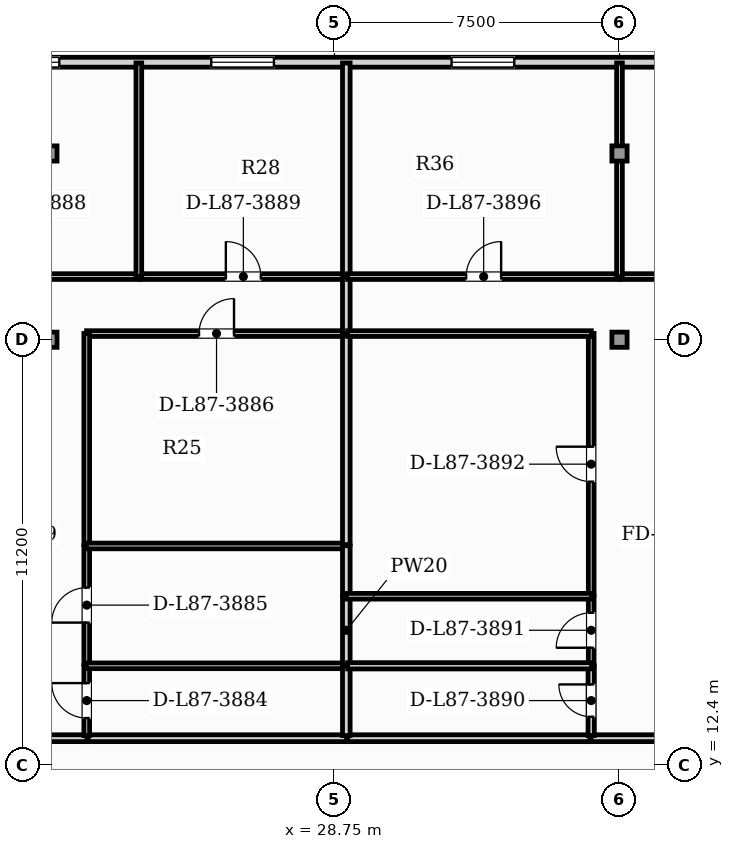
"""IFC4 building model, lengths in metres.
Left out: names, types, materials, properties, quantities, classifications, styles, units other than length and angle.
Written with IfcOpenShell. Run it as: python <this file> out.ifc"""

import sys

from ifc_helpers import new_model, si_unit, direction, frame, frame_2d, origin, origin_2d, place, context, subcontext, project, spatial, rectangle, hollow_rectangle, extrude, element, fill, save


model = new_model("IFC4")
c1 = context("Model", 3, precision=1e-05, world=origin(), true_north=direction((0.0, 1.0)))
c2 = subcontext(c1, "Body", "Model", "MODEL_VIEW")
j1 = project(units=[si_unit("LENGTHUNIT", "METRE"), si_unit("PLANEANGLEUNIT", "RADIAN")], contexts=[c1])
p1 = place(None, origin())
s1 = spatial("IfcSite", under=j1, at=p1, CompositionType="ELEMENT")
p2 = place(p1, origin())
s2 = spatial("IfcBuilding", under=s1, at=p2, CompositionType="ELEMENT")
p3 = place(p2, frame((0.0, 0.0, 353.45)))
s3 = spatial("IfcBuildingStorey", under=s2, at=p3, CompositionType="ELEMENT", Elevation=353.45)
for number, where, z_axis, x_axis in (
    (1, (21.25, 23.6, 0.0), (0.0, 0.0, 1.0), (1.0, 0.0, 0.0)),
    (2, (36.25, 23.6, 0.0), (0.0, 0.0, 1.0), (1.0, 0.0, 0.0)),
    (3, (21.25, 28.5, 0.0), (0.0, 0.0, 1.0), (1.0, 0.0, 0.0)),
    (4, (36.25, 28.5, 0.0), (0.0, 0.0, 1.0), (1.0, 0.0, 0.0)),
):
    element("IfcColumn", number, at=place(p3, frame(where, z_axis=z_axis, x_axis=x_axis)), inside=s3, PredefinedType="COLUMN", context=c2, shape_type="SweptSolid", body=[
        extrude(hollow_rectangle(XDim=0.4, YDim=0.4, WallThickness=0.02, at=origin_2d()), origin(), (0.0, 0.0, 1.0), 4.4),
    ])
p4 = place(p3, frame((44.627, 30.901, 0.0), z_axis=(0.0, 0.0, 1.0), x_axis=(-1.0, 0.0, 0.0)))
e5 = element("IfcWall", 5, at=p4, inside=s3, PredefinedType="SOLIDWALL", context=c2, shape_type="SweptSolid", body=[
    extrude(rectangle(XDim=31.754, YDim=0.26, at=frame_2d((15.877, 0.0))), origin(), (0.0, 0.0, 1.0), 4.14),
])
p5 = place(p4, frame((29.334, 0.0, 0.88)))
e6 = element("IfcOpeningElement", 6, at=p5, cuts=e5, PredefinedType="OPENING", context=c2, shape_type="SweptSolid", body=[
    extrude(rectangle(XDim=1.65, YDim=2.0, at=frame_2d((0.825, 1.0))), frame((0.0, 0.14, 0.0), z_axis=(0.0, -1.0, 0.0), x_axis=(1.0, 0.0, 0.0)), (0.0, 0.0, 1.0), 0.28),
])
p6 = place(p4, frame((23.117, 0.0, 0.88)))
e7 = element("IfcOpeningElement", 7, at=p6, cuts=e5, PredefinedType="OPENING", context=c2, shape_type="SweptSolid", body=[
    extrude(rectangle(XDim=1.65, YDim=2.0, at=frame_2d((0.825, 1.0))), frame((0.0, 0.14, 0.0), z_axis=(0.0, -1.0, 0.0), x_axis=(1.0, 0.0, 0.0)), (0.0, 0.0, 1.0), 0.28),
])
p7 = place(p4, frame((17.469, 0.0, 0.88)))
e8 = element("IfcOpeningElement", 8, at=p7, cuts=e5, PredefinedType="OPENING", context=c2, shape_type="SweptSolid", body=[
    extrude(rectangle(XDim=1.65, YDim=2.0, at=frame_2d((0.825, 1.0))), frame((0.0, 0.14, 0.0), z_axis=(0.0, -1.0, 0.0), x_axis=(1.0, 0.0, 0.0)), (0.0, 0.0, 1.0), 0.28),
])
p8 = place(p4, frame((11.146, 0.0, 0.88)))
e9 = element("IfcOpeningElement", 9, at=p8, cuts=e5, PredefinedType="OPENING", context=c2, shape_type="SweptSolid", body=[
    extrude(rectangle(XDim=1.65, YDim=2.0, at=frame_2d((0.825, 1.0))), frame((0.0, 0.14, 0.0), z_axis=(0.0, -1.0, 0.0), x_axis=(1.0, 0.0, 0.0)), (0.0, 0.0, 1.0), 0.28),
])
p9 = place(p4, frame((4.732, 0.0, 0.88)))
e10 = element("IfcOpeningElement", 10, at=p9, cuts=e5, PredefinedType="OPENING", context=c2, shape_type="SweptSolid", body=[
    extrude(rectangle(XDim=1.65, YDim=2.0, at=frame_2d((0.825, 1.0))), frame((0.0, 0.14, 0.0), z_axis=(0.0, -1.0, 0.0), x_axis=(1.0, 0.0, 0.0)), (0.0, 0.0, 1.0), 0.28),
])
p10 = place(p3, frame((17.248, 13.115, 0.0), z_axis=(0.0, 0.0, 1.0), x_axis=(1.0, 0.0, 0.0)))
e11 = element("IfcWall", 11, at=p10, inside=s3, PredefinedType="PARTITIONING", context=c2, shape_type="SweptSolid", body=[
    extrude(rectangle(XDim=4.99, YDim=0.18, at=frame_2d((2.495, 0.0))), origin(), (0.0, 0.0, 1.0), 4.14),
])
p11 = place(p10, frame((1.995, 0.0, 0.0)))
e12 = element("IfcOpeningElement", 12, at=p11, cuts=e11, PredefinedType="OPENING", context=c2, shape_type="SweptSolid", body=[
    extrude(rectangle(XDim=1.0, YDim=2.15, at=frame_2d((0.5, 1.075))), frame((0.0, 0.1, 0.0), z_axis=(0.0, -1.0, 0.0), x_axis=(1.0, 0.0, 0.0)), (0.0, 0.0, 1.0), 0.2),
])
p12 = place(p3, frame((22.268, 13.115, 0.0), z_axis=(0.0, 0.0, 1.0), x_axis=(1.0, 0.0, 0.0)))
e13 = element("IfcWall", 13, at=p12, inside=s3, PredefinedType="PARTITIONING", context=c2, shape_type="SweptSolid", body=[
    extrude(rectangle(XDim=6.8, YDim=0.18, at=frame_2d((3.4, 0.0))), origin(), (0.0, 0.0, 1.0), 4.14),
])
p13 = place(p3, frame((35.5, 13.115, 0.0), z_axis=(0.0, 0.0, 1.0), x_axis=(1.0, 0.0, 0.0)))
e14 = element("IfcWall", 14, at=p13, inside=s3, PredefinedType="PARTITIONING", context=c2, shape_type="SweptSolid", body=[
    extrude(rectangle(XDim=4.99, YDim=0.18, at=frame_2d((2.495, 0.0))), origin(), (0.0, 0.0, 1.0), 4.14),
])
p14 = place(p13, frame((1.995, 0.0, 0.0)))
e15 = element("IfcOpeningElement", 15, at=p14, cuts=e14, PredefinedType="OPENING", context=c2, shape_type="SweptSolid", body=[
    extrude(rectangle(XDim=1.0, YDim=2.15, at=frame_2d((0.5, 1.075))), frame((0.0, 0.1, 0.0), z_axis=(0.0, -1.0, 0.0), x_axis=(1.0, 0.0, 0.0)), (0.0, 0.0, 1.0), 0.2),
])
p15 = place(p3, frame((29.097, 13.115, 0.0), z_axis=(0.0, 0.0, 1.0), x_axis=(1.0, 0.0, 0.0)))
e16 = element("IfcWall", 16, at=p15, inside=s3, PredefinedType="PARTITIONING", context=c2, shape_type="SweptSolid", body=[
    extrude(rectangle(XDim=6.373, YDim=0.18, at=frame_2d((3.187, 0.0))), origin(), (0.0, 0.0, 1.0), 4.14),
])
p16 = place(p3, frame((22.232, 13.185, 0.0), z_axis=(0.0, 0.0, 1.0), x_axis=(0.0, 1.0, 0.0)))
e17 = element("IfcWall", 17, at=p16, inside=s3, PredefinedType="PARTITIONING", context=c2, shape_type="SweptSolid", body=[
    extrude(rectangle(XDim=1.84, YDim=0.15, at=frame_2d((0.92, 0.0))), origin(), (0.0, 0.0, 1.0), 4.14),
])
p17 = place(p16, frame((0.46, 0.0, 0.0)))
e18 = element("IfcOpeningElement", 18, at=p17, cuts=e17, PredefinedType="OPENING", context=c2, shape_type="SweptSolid", body=[
    extrude(rectangle(XDim=0.92, YDim=2.1, at=frame_2d((0.46, 1.05))), frame((0.0, 0.085, 0.0), z_axis=(0.0, -1.0, 0.0), x_axis=(1.0, 0.0, 0.0)), (0.0, 0.0, 1.0), 0.17),
])
p18 = place(p3, frame((22.232, 15.055, 0.0), z_axis=(0.0, 0.0, 1.0), x_axis=(0.0, 1.0, 0.0)))
e19 = element("IfcWall", 19, at=p18, inside=s3, PredefinedType="PARTITIONING", context=c2, shape_type="SweptSolid", body=[
    extrude(rectangle(XDim=3.124, YDim=0.15, at=frame_2d((1.562, 0.0))), origin(), (0.0, 0.0, 1.0), 4.14),
])
p19 = place(p18, frame((1.102, 0.0, 0.0)))
e20 = element("IfcOpeningElement", 20, at=p19, cuts=e19, PredefinedType="OPENING", context=c2, shape_type="SweptSolid", body=[
    extrude(rectangle(XDim=0.92, YDim=2.1, at=frame_2d((0.46, 1.05))), frame((0.0, 0.085, 0.0), z_axis=(0.0, -1.0, 0.0), x_axis=(1.0, 0.0, 0.0)), (0.0, 0.0, 1.0), 0.17),
])
p20 = place(p3, frame((22.228, 23.761, 0.0), z_axis=(0.0, 0.0, 1.0), x_axis=(1.0, 0.0, 0.0)))
e21 = element("IfcWall", 21, at=p20, inside=s3, PredefinedType="PARTITIONING", context=c2, shape_type="SweptSolid", body=[
    extrude(rectangle(XDim=6.84, YDim=0.15, at=frame_2d((3.42, 0.0))), origin(), (0.0, 0.0, 1.0), 3.24),
])
p21 = place(p20, frame((2.96, 0.0, 0.0)))
e22 = element("IfcOpeningElement", 22, at=p21, cuts=e21, PredefinedType="OPENING", context=c2, shape_type="SweptSolid", body=[
    extrude(rectangle(XDim=0.92, YDim=2.1, at=frame_2d((0.46, 1.05))), frame((0.0, 0.085, 0.0), z_axis=(0.0, -1.0, 0.0), x_axis=(1.0, 0.0, 0.0)), (0.0, 0.0, 1.0), 0.17),
])
p22 = place(p3, frame((22.232, 18.208, 0.0), z_axis=(0.0, 0.0, 1.0), x_axis=(0.0, 1.0, 0.0)))
e23 = element("IfcWall", 23, at=p22, inside=s3, PredefinedType="PARTITIONING", context=c2, shape_type="SweptSolid", body=[
    extrude(rectangle(XDim=5.558, YDim=0.15, at=frame_2d((2.779, 0.0))), origin(), (0.0, 0.0, 1.0), 4.14),
])
p23 = place(p3, frame((17.802, 25.261, 0.0), z_axis=(0.0, 0.0, 1.0), x_axis=(1.0, 0.0, 0.0)))
e24 = element("IfcWall", 24, at=p23, inside=s3, PredefinedType="PARTITIONING", context=c2, shape_type="SweptSolid", body=[
    extrude(rectangle(XDim=5.806, YDim=0.15, at=frame_2d((2.903, 0.0))), origin(), (0.0, 0.0, 1.0), 4.14),
])
p24 = place(p23, frame((2.443, 0.0, 0.0)))
e25 = element("IfcOpeningElement", 25, at=p24, cuts=e24, PredefinedType="OPENING", context=c2, shape_type="SweptSolid", body=[
    extrude(rectangle(XDim=0.92, YDim=2.1, at=frame_2d((0.46, 1.05))), frame((0.0, 0.085, 0.0), z_axis=(0.0, -1.0, 0.0), x_axis=(1.0, 0.0, 0.0)), (0.0, 0.0, 1.0), 0.17),
])
p25 = place(p3, frame((23.638, 25.261, 0.0), z_axis=(0.0, 0.0, 1.0), x_axis=(1.0, 0.0, 0.0)))
e26 = element("IfcWall", 26, at=p25, inside=s3, PredefinedType="PARTITIONING", context=c2, shape_type="SweptSolid", body=[
    extrude(rectangle(XDim=5.429, YDim=0.15, at=frame_2d((2.714, 0.0))), origin(), (0.0, 0.0, 1.0), 4.14),
])
p26 = place(p25, frame((2.254, 0.0, 0.0)))
e27 = element("IfcOpeningElement", 27, at=p26, cuts=e26, PredefinedType="OPENING", context=c2, shape_type="SweptSolid", body=[
    extrude(rectangle(XDim=0.92, YDim=2.1, at=frame_2d((0.46, 1.05))), frame((0.0, 0.085, 0.0), z_axis=(0.0, -1.0, 0.0), x_axis=(1.0, 0.0, 0.0)), (0.0, 0.0, 1.0), 0.17),
])
p27 = place(p3, frame((29.062, 23.756, 0.0), z_axis=(0.0, 0.0, 1.0), x_axis=(0.0, 1.0, 0.0)))
e28 = element("IfcWall", 28, at=p27, inside=s3, PredefinedType="PARTITIONING", context=c2, shape_type="SweptSolid", body=[
    extrude(rectangle(XDim=1.51, YDim=0.2, at=frame_2d((0.755, 0.0))), origin(), (0.0, 0.0, 1.0), 4.14),
])
p28 = place(p3, frame((22.228, 15.02, 0.0), z_axis=(0.0, 0.0, 1.0), x_axis=(1.0, 0.0, 0.0)))
e29 = element("IfcWall", 29, at=p28, inside=s3, PredefinedType="PARTITIONING", context=c2, shape_type="SweptSolid", body=[
    extrude(rectangle(XDim=6.84, YDim=0.15, at=frame_2d((3.42, 0.0))), origin(), (0.0, 0.0, 1.0), 4.14),
])
p29 = place(p3, frame((29.062, 13.185, 0.0), z_axis=(0.0, 0.0, 1.0), x_axis=(0.0, 1.0, 0.0)))
e30 = element("IfcWall", 30, at=p29, inside=s3, PredefinedType="PARTITIONING", context=c2, shape_type="SweptSolid", body=[
    extrude(rectangle(XDim=1.84, YDim=0.2, at=frame_2d((0.92, 0.0))), origin(), (0.0, 0.0, 1.0), 4.14),
])
p30 = place(p3, frame((22.228, 18.173, 0.0), z_axis=(0.0, 0.0, 1.0), x_axis=(1.0, 0.0, 0.0)))
e31 = element("IfcWall", 31, at=p30, inside=s3, PredefinedType="PARTITIONING", context=c2, shape_type="SweptSolid", body=[
    extrude(rectangle(XDim=6.84, YDim=0.15, at=frame_2d((3.42, 0.0))), origin(), (0.0, 0.0, 1.0), 4.14),
])
p31 = place(p3, frame((29.062, 15.055, 0.0), z_axis=(0.0, 0.0, 1.0), x_axis=(0.0, 1.0, 0.0)))
e32 = element("IfcWall", 32, at=p31, inside=s3, PredefinedType="PARTITIONING", context=c2, shape_type="SweptSolid", body=[
    extrude(rectangle(XDim=1.8, YDim=0.2, at=frame_2d((0.9, 0.0))), origin(), (0.0, 0.0, 1.0), 4.14),
])
p32 = place(p3, frame((29.062, 16.885, 0.0), z_axis=(0.0, 0.0, 1.0), x_axis=(0.0, 1.0, 0.0)))
e33 = element("IfcWall", 33, at=p32, inside=s3, PredefinedType="PARTITIONING", context=c2, shape_type="SweptSolid", body=[
    extrude(rectangle(XDim=1.293, YDim=0.2, at=frame_2d((0.647, 0.0))), origin(), (0.0, 0.0, 1.0), 4.14),
])
p33 = place(p3, frame((29.062, 18.208, 0.0), z_axis=(0.0, 0.0, 1.0), x_axis=(0.0, 1.0, 0.0)))
e34 = element("IfcWall", 34, at=p33, inside=s3, PredefinedType="PARTITIONING", context=c2, shape_type="SweptSolid", body=[
    extrude(rectangle(XDim=5.518, YDim=0.2, at=frame_2d((2.759, 0.0))), origin(), (0.0, 0.0, 1.0), 4.14),
])
p34 = place(p3, frame((23.603, 25.256, 0.0), z_axis=(0.0, 0.0, 1.0), x_axis=(0.0, 1.0, 0.0)))
e35 = element("IfcWall", 35, at=p34, inside=s3, PredefinedType="PARTITIONING", context=c2, shape_type="SweptSolid", body=[
    extrude(rectangle(XDim=5.625, YDim=0.15, at=frame_2d((2.813, 0.0))), origin(), (0.0, 0.0, 1.0), 4.14),
])
p35 = place(p3, frame((29.062, 25.296, 0.0), z_axis=(0.0, 0.0, 1.0), x_axis=(0.0, 1.0, 0.0)))
e36 = element("IfcWall", 36, at=p35, inside=s3, PredefinedType="PARTITIONING", context=c2, shape_type="SweptSolid", body=[
    extrude(rectangle(XDim=5.585, YDim=0.2, at=frame_2d((2.793, 0.0))), origin(), (0.0, 0.0, 1.0), 4.14),
])
p36 = place(p3, frame((35.506, 13.185, 0.0), z_axis=(0.0, 0.0, 1.0), x_axis=(0.0, 1.0, 0.0)))
e37 = element("IfcWall", 37, at=p36, inside=s3, PredefinedType="PLUMBINGWALL", context=c2, shape_type="SweptSolid", body=[
    extrude(rectangle(XDim=1.84, YDim=0.165, at=frame_2d((0.92, 0.0))), origin(), (0.0, 0.0, 1.0), 4.14),
])
p37 = place(p36, frame((0.495, 0.0, 0.0)))
e38 = element("IfcOpeningElement", 38, at=p37, cuts=e37, PredefinedType="OPENING", context=c2, shape_type="SweptSolid", body=[
    extrude(rectangle(XDim=0.85, YDim=2.1, at=frame_2d((0.425, 1.05))), frame((0.0, 0.093, 0.0), z_axis=(0.0, -1.0, 0.0), x_axis=(1.0, 0.0, 0.0)), (0.0, 0.0, 1.0), 0.185),
])
p38 = place(p3, frame((35.506, 15.055, 0.0), z_axis=(0.0, 0.0, 1.0), x_axis=(0.0, 1.0, 0.0)))
e39 = element("IfcWall", 39, at=p38, inside=s3, PredefinedType="PARTITIONING", context=c2, shape_type="SweptSolid", body=[
    extrude(rectangle(XDim=1.8, YDim=0.15, at=frame_2d((0.9, 0.0))), origin(), (0.0, 0.0, 1.0), 4.14),
])
p39 = place(p38, frame((0.44, 0.0, 0.0)))
e40 = element("IfcOpeningElement", 40, at=p39, cuts=e39, PredefinedType="OPENING", context=c2, shape_type="SweptSolid", body=[
    extrude(rectangle(XDim=0.92, YDim=2.1, at=frame_2d((0.46, 1.05))), frame((0.0, 0.085, 0.0), z_axis=(0.0, -1.0, 0.0), x_axis=(1.0, 0.0, 0.0)), (0.0, 0.0, 1.0), 0.17),
])
p40 = place(p3, frame((35.506, 16.885, 0.0), z_axis=(0.0, 0.0, 1.0), x_axis=(0.0, 1.0, 0.0)))
e41 = element("IfcWall", 41, at=p40, inside=s3, PredefinedType="PARTITIONING", context=c2, shape_type="SweptSolid", body=[
    extrude(rectangle(XDim=6.881, YDim=0.15, at=frame_2d((3.44, 0.0))), origin(), (0.0, 0.0, 1.0), 4.14),
])
p41 = place(p40, frame((2.981, 0.0, 0.0)))
e42 = element("IfcOpeningElement", 42, at=p41, cuts=e41, PredefinedType="OPENING", context=c2, shape_type="SweptSolid", body=[
    extrude(rectangle(XDim=0.92, YDim=2.1, at=frame_2d((0.46, 1.05))), frame((0.0, 0.085, 0.0), z_axis=(0.0, -1.0, 0.0), x_axis=(1.0, 0.0, 0.0)), (0.0, 0.0, 1.0), 0.17),
])
p42 = place(p3, frame((29.097, 23.761, 0.0), z_axis=(0.0, 0.0, 1.0), x_axis=(1.0, 0.0, 0.0)))
e43 = element("IfcWall", 43, at=p42, inside=s3, PredefinedType="PARTITIONING", context=c2, shape_type="SweptSolid", body=[
    extrude(rectangle(XDim=6.413, YDim=0.15, at=frame_2d((3.207, 0.0))), origin(), (0.0, 0.0, 1.0), 3.24),
])
p43 = place(p3, frame((29.097, 25.261, 0.0), z_axis=(0.0, 0.0, 1.0), x_axis=(1.0, 0.0, 0.0)))
e44 = element("IfcWall", 44, at=p43, inside=s3, PredefinedType="PARTITIONING", context=c2, shape_type="SweptSolid", body=[
    extrude(rectangle(XDim=7.158, YDim=0.15, at=frame_2d((3.579, 0.0))), origin(), (0.0, 0.0, 1.0), 4.14),
])
p44 = place(p43, frame((3.119, 0.0, 0.0)))
e45 = element("IfcOpeningElement", 45, at=p44, cuts=e44, PredefinedType="OPENING", context=c2, shape_type="SweptSolid", body=[
    extrude(rectangle(XDim=0.92, YDim=2.1, at=frame_2d((0.46, 1.05))), frame((0.0, 0.085, 0.0), z_axis=(0.0, -1.0, 0.0), x_axis=(1.0, 0.0, 0.0)), (0.0, 0.0, 1.0), 0.17),
])
p45 = place(p3, frame((36.285, 25.261, 0.0), z_axis=(0.0, 0.0, 1.0), x_axis=(1.0, 0.0, 0.0)))
e46 = element("IfcWall", 46, at=p45, inside=s3, PredefinedType="PARTITIONING", context=c2, shape_type="SweptSolid", body=[
    extrude(rectangle(XDim=5.611, YDim=0.15, at=frame_2d((2.806, 0.0))), origin(), (0.0, 0.0, 1.0), 4.14),
])
p46 = place(p45, frame((2.345, 0.0, 0.0)))
e47 = element("IfcOpeningElement", 47, at=p46, cuts=e46, PredefinedType="OPENING", context=c2, shape_type="SweptSolid", body=[
    extrude(rectangle(XDim=0.92, YDim=2.1, at=frame_2d((0.46, 1.05))), frame((0.0, 0.085, 0.0), z_axis=(0.0, -1.0, 0.0), x_axis=(1.0, 0.0, 0.0)), (0.0, 0.0, 1.0), 0.17),
])
p47 = place(p3, frame((29.097, 15.02, 0.0), z_axis=(0.0, 0.0, 1.0), x_axis=(1.0, 0.0, 0.0)))
e48 = element("IfcWall", 48, at=p47, inside=s3, PredefinedType="PLUMBINGWALL", context=c2, shape_type="SweptSolid", body=[
    extrude(rectangle(XDim=6.413, YDim=0.165, at=frame_2d((3.207, 0.0))), origin(), (0.0, 0.0, 1.0), 4.14),
])
p48 = place(p3, frame((29.057, 16.85, 0.0), z_axis=(0.0, 0.0, 1.0), x_axis=(1.0, 0.0, 0.0)))
e49 = element("IfcWall", 49, at=p48, inside=s3, PredefinedType="PARTITIONING", context=c2, shape_type="SweptSolid", body=[
    extrude(rectangle(XDim=6.453, YDim=0.15, at=frame_2d((3.227, 0.0))), origin(), (0.0, 0.0, 1.0), 4.14),
])
p49 = place(p3, frame((36.25, 25.256, 0.0), z_axis=(0.0, 0.0, 1.0), x_axis=(0.0, 1.0, 0.0)))
e50 = element("IfcWall", 50, at=p49, inside=s3, PredefinedType="PARTITIONING", context=c2, shape_type="SweptSolid", body=[
    extrude(rectangle(XDim=5.625, YDim=0.15, at=frame_2d((2.813, 0.0))), origin(), (0.0, 0.0, 1.0), 3.837),
])
p50 = place(p6, origin())
e51 = element("IfcWindow", 51, at=p50, inside=s3, PartitioningType="SINGLE_PANEL", PredefinedType="WINDOW", context=c2, shape_type="SweptSolid", body=[
    extrude(rectangle(XDim=1.65, YDim=2.0, at=frame_2d((0.825, 1.0))), frame((0.0, 0.03, 0.0), z_axis=(0.0, -1.0, 0.0), x_axis=(1.0, 0.0, 0.0)), (0.0, 0.0, 1.0), 0.06),
])
fill(e7, e51)
p51 = place(p7, origin())
e52 = element("IfcWindow", 52, at=p51, inside=s3, PartitioningType="SINGLE_PANEL", PredefinedType="WINDOW", context=c2, shape_type="SweptSolid", body=[
    extrude(rectangle(XDim=1.65, YDim=2.0, at=frame_2d((0.825, 1.0))), frame((0.0, 0.03, 0.0), z_axis=(0.0, -1.0, 0.0), x_axis=(1.0, 0.0, 0.0)), (0.0, 0.0, 1.0), 0.06),
])
fill(e8, e52)
p52 = place(p8, origin())
e53 = element("IfcWindow", 53, at=p52, inside=s3, PartitioningType="SINGLE_PANEL", PredefinedType="WINDOW", context=c2, shape_type="SweptSolid", body=[
    extrude(rectangle(XDim=1.65, YDim=2.0, at=frame_2d((0.825, 1.0))), frame((0.0, 0.03, 0.0), z_axis=(0.0, -1.0, 0.0), x_axis=(1.0, 0.0, 0.0)), (0.0, 0.0, 1.0), 0.06),
])
fill(e9, e53)
p53 = place(p17, origin())
e54 = element("IfcDoor", 54, at=p53, inside=s3, OperationType="SINGLE_SWING_RIGHT", PredefinedType="DOOR", context=c2, shape_type="SweptSolid", body=[
    extrude(rectangle(XDim=0.92, YDim=2.1, at=frame_2d((0.46, 1.05))), frame((0.0, 0.025, 0.0), z_axis=(0.0, -1.0, 0.0), x_axis=(1.0, 0.0, 0.0)), (0.0, 0.0, 1.0), 0.05),
])
fill(e18, e54)
p54 = place(p19, origin())
e55 = element("IfcDoor", 55, at=p54, inside=s3, OperationType="SINGLE_SWING_LEFT", PredefinedType="DOOR", context=c2, shape_type="SweptSolid", body=[
    extrude(rectangle(XDim=0.92, YDim=2.1, at=frame_2d((0.46, 1.05))), frame((0.0, 0.025, 0.0), z_axis=(0.0, -1.0, 0.0), x_axis=(1.0, 0.0, 0.0)), (0.0, 0.0, 1.0), 0.05),
])
fill(e20, e55)
p55 = place(p21, origin())
e56 = element("IfcDoor", 56, at=p55, inside=s3, OperationType="SINGLE_SWING_RIGHT", PredefinedType="DOOR", context=c2, shape_type="SweptSolid", body=[
    extrude(rectangle(XDim=0.92, YDim=2.1, at=frame_2d((0.46, 1.05))), frame((0.0, 0.025, 0.0), z_axis=(0.0, -1.0, 0.0), x_axis=(1.0, 0.0, 0.0)), (0.0, 0.0, 1.0), 0.05),
])
fill(e22, e56)
p56 = place(p26, origin())
e57 = element("IfcDoor", 57, at=p56, inside=s3, OperationType="SINGLE_SWING_LEFT", PredefinedType="DOOR", context=c2, shape_type="SweptSolid", body=[
    extrude(rectangle(XDim=0.92, YDim=2.1, at=frame_2d((0.46, 1.05))), frame((0.0, 0.025, 0.0), z_axis=(0.0, -1.0, 0.0), x_axis=(1.0, 0.0, 0.0)), (0.0, 0.0, 1.0), 0.05),
])
fill(e27, e57)
p57 = place(p37, origin())
e58 = element("IfcDoor", 58, at=p57, inside=s3, OperationType="SINGLE_SWING_RIGHT", PredefinedType="DOOR", context=c2, shape_type="SweptSolid", body=[
    extrude(rectangle(XDim=0.85, YDim=2.1, at=frame_2d((0.425, 1.05))), frame((0.0, 0.025, 0.0), z_axis=(0.0, -1.0, 0.0), x_axis=(1.0, 0.0, 0.0)), (0.0, 0.0, 1.0), 0.05),
])
fill(e38, e58)
p58 = place(p39, origin())
e59 = element("IfcDoor", 59, at=p58, inside=s3, OperationType="SINGLE_SWING_LEFT", PredefinedType="DOOR", context=c2, shape_type="SweptSolid", body=[
    extrude(rectangle(XDim=0.92, YDim=2.1, at=frame_2d((0.46, 1.05))), frame((0.0, 0.025, 0.0), z_axis=(0.0, -1.0, 0.0), x_axis=(1.0, 0.0, 0.0)), (0.0, 0.0, 1.0), 0.05),
])
fill(e40, e59)
p59 = place(p41, origin())
e60 = element("IfcDoor", 60, at=p59, inside=s3, OperationType="SINGLE_SWING_RIGHT", PredefinedType="DOOR", context=c2, shape_type="SweptSolid", body=[
    extrude(rectangle(XDim=0.92, YDim=2.1, at=frame_2d((0.46, 1.05))), frame((0.0, 0.025, 0.0), z_axis=(0.0, -1.0, 0.0), x_axis=(1.0, 0.0, 0.0)), (0.0, 0.0, 1.0), 0.05),
])
fill(e42, e60)
p60 = place(p44, origin())
e61 = element("IfcDoor", 61, at=p60, inside=s3, OperationType="SINGLE_SWING_RIGHT", PredefinedType="DOOR", context=c2, shape_type="SweptSolid", body=[
    extrude(rectangle(XDim=0.92, YDim=2.1, at=frame_2d((0.46, 1.05))), frame((0.0, 0.025, 0.0), z_axis=(0.0, -1.0, 0.0), x_axis=(1.0, 0.0, 0.0)), (0.0, 0.0, 1.0), 0.05),
])
fill(e45, e61)
save(model, sys.argv[1])
